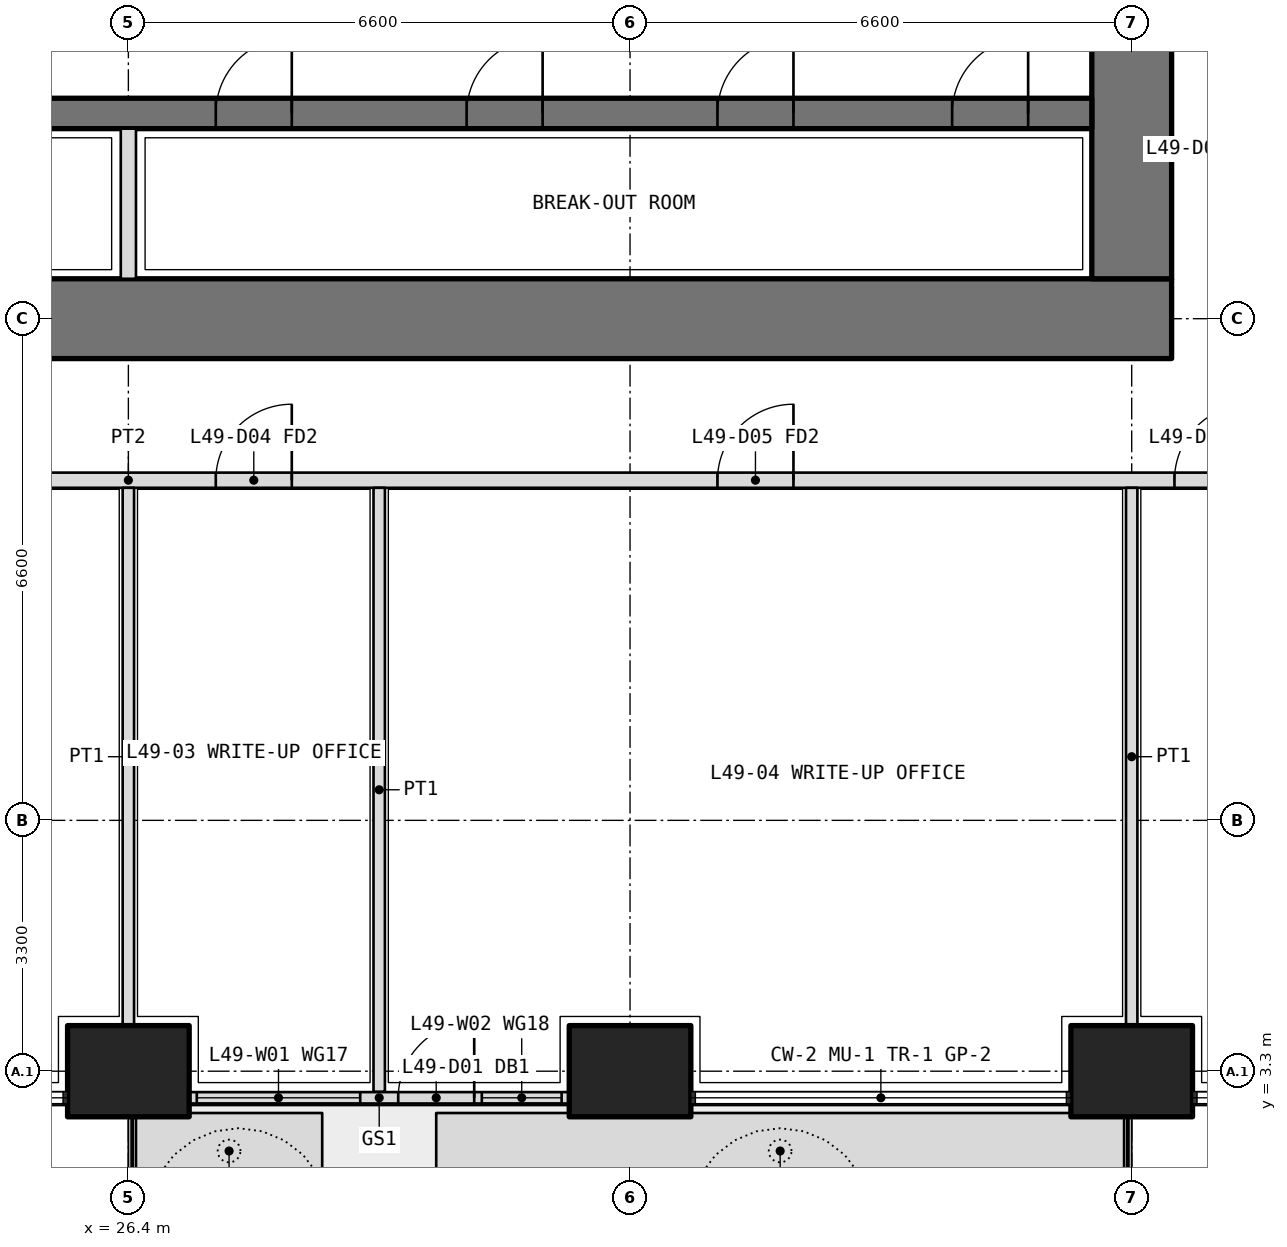
"""IFC4 building model, lengths in metres.
Left out: names, types, materials, properties, quantities, classifications, styles, units other than length and angle.
Written with IfcOpenShell. Run it as: python <this file> out.ifc"""

import sys

from ifc_helpers import new_model, si_unit, direction, frame, frame_2d, origin, origin_2d, place, context, subcontext, project, spatial, polyline, rectangle, outline, extrude, element, fill, save


model = new_model("IFC4")
c1 = context("Model", 3, precision=1e-05, world=origin(), true_north=direction((0.0, 1.0)))
c2 = subcontext(c1, "Body", "Model", "MODEL_VIEW")
j1 = project(units=[si_unit("LENGTHUNIT", "METRE"), si_unit("PLANEANGLEUNIT", "RADIAN")], contexts=[c1])
p1 = place(None, origin())
s1 = spatial("IfcSite", under=j1, at=p1, CompositionType="ELEMENT")
p2 = place(p1, origin())
s2 = spatial("IfcBuilding", under=s1, at=p2, CompositionType="ELEMENT")
p3 = place(p2, frame((0.0, 0.0, 214.5)))
s3 = spatial("IfcBuildingStorey", under=s2, at=p3, CompositionType="ELEMENT", Elevation=214.5)
for number, where, z_axis, x_axis in (
    (1, (26.4, 3.3, 0.0), (0.0, 0.0, 1.0), (1.0, 0.0, 0.0)),
    (2, (33.0, 3.3, 0.0), (0.0, 0.0, 1.0), (1.0, 0.0, 0.0)),
    (3, (39.6, 3.3, 0.0), (0.0, 0.0, 1.0), (1.0, 0.0, 0.0)),
):
    element("IfcColumn", number, at=place(p3, frame(where, z_axis=z_axis, x_axis=x_axis)), inside=s3, PredefinedType="COLUMN", context=c2, shape_type="SweptSolid", body=[
        extrude(rectangle(XDim=1.6, YDim=1.2, at=origin_2d()), origin(), (0.0, 0.0, 1.0), 4.2),
    ])
p4 = place(p3, origin())
e4 = element("IfcWall", 4, at=p4, inside=s3, PredefinedType="USERDEFINED", context=c2, shape_type="SweptSolid", body=[
    extrude(outline(polyline([(26.5, 1.75), (28.95, 1.75), (28.95, 2.75), (26.5, 2.75), (26.5, 1.75)]), holes=[polyline([(26.65, 1.9), (28.8, 1.9), (28.8, 2.6), (26.65, 2.6), (26.65, 1.9)])]), origin(), (0.0, 0.0, 1.0), 1.05),
])
p5 = place(p3, origin())
e5 = element("IfcWall", 5, at=p5, inside=s3, PredefinedType="USERDEFINED", context=c2, shape_type="SweptSolid", body=[
    extrude(outline(polyline([(30.45, 1.75), (39.5, 1.75), (39.5, 2.75), (30.45, 2.75), (30.45, 1.75)]), holes=[polyline([(30.6, 1.9), (39.35, 1.9), (39.35, 2.6), (30.6, 2.6), (30.6, 1.9)])]), origin(), (0.0, 0.0, 1.0), 1.05),
])
p6 = place(p3, frame((27.2, 2.95, 0.0), z_axis=(0.0, 0.0, 1.0), x_axis=(1.0, 0.0, 0.0)))
e6 = element("IfcWall", 6, at=p6, inside=s3, PredefinedType="SOLIDWALL", context=c2, shape_type="SweptSolid", body=[
    extrude(rectangle(XDim=5.0, YDim=0.15, at=frame_2d((2.5, 0.0))), origin(), (0.0, 0.0, 1.0), 2.6),
])
p7 = place(p6, frame((2.75, 0.0, 0.0)))
e7 = element("IfcOpeningElement", 7, at=p7, cuts=e6, PredefinedType="OPENING", context=c2, shape_type="SweptSolid", body=[
    extrude(rectangle(XDim=1.0, YDim=2.4, at=frame_2d((0.5, 1.2))), frame((0.0, 0.085, 0.0), z_axis=(0.0, -1.0, 0.0), x_axis=(1.0, 0.0, 0.0)), (0.0, 0.0, 1.0), 0.17),
])
p8 = place(p6, frame((0.1, 0.0, 0.1)))
e8 = element("IfcOpeningElement", 8, at=p8, cuts=e6, PredefinedType="OPENING", context=c2, shape_type="SweptSolid", body=[
    extrude(rectangle(XDim=2.15, YDim=2.2, at=frame_2d((1.075, 1.1))), frame((0.0, 0.085, 0.0), z_axis=(0.0, -1.0, 0.0), x_axis=(1.0, 0.0, 0.0)), (0.0, 0.0, 1.0), 0.17),
])
p9 = place(p6, frame((3.85, 0.0, 0.1)))
e9 = element("IfcOpeningElement", 9, at=p9, cuts=e6, PredefinedType="OPENING", context=c2, shape_type="SweptSolid", body=[
    extrude(rectangle(XDim=1.05, YDim=2.2, at=frame_2d((0.525, 1.1))), frame((0.0, 0.085, 0.0), z_axis=(0.0, -1.0, 0.0), x_axis=(1.0, 0.0, 0.0)), (0.0, 0.0, 1.0), 0.17),
])
p10 = place(p3, frame((12.675, 13.2, 0.0), z_axis=(0.0, 0.0, 1.0), x_axis=(1.0, 0.0, 0.0)))
e10 = element("IfcWall", 10, at=p10, inside=s3, PredefinedType="SHEAR", context=c2, shape_type="SweptSolid", body=[
    extrude(rectangle(XDim=27.45, YDim=1.05, at=frame_2d((13.725, 0.0))), origin(), (0.0, 0.0, 1.0), 4.2),
])
p11 = place(p3, frame((39.6, 13.725, 0.0), z_axis=(0.0, 0.0, 1.0), x_axis=(0.0, 1.0, 0.0)))
e11 = element("IfcWall", 11, at=p11, inside=s3, PredefinedType="SHEAR", context=c2, shape_type="SweptSolid", body=[
    extrude(rectangle(XDim=18.75, YDim=1.05, at=frame_2d((9.375, 0.0))), origin(), (0.0, 0.0, 1.0), 4.2),
])
p12 = place(p11, frame((3.025, 0.0, 0.0)))
e12 = element("IfcOpeningElement", 12, at=p12, cuts=e11, PredefinedType="OPENING", context=c2, shape_type="SweptSolid", body=[
    extrude(rectangle(XDim=1.6, YDim=2.1, at=frame_2d((0.8, 1.05))), frame((0.0, 0.535, 0.0), z_axis=(0.0, -1.0, 0.0), x_axis=(1.0, 0.0, 0.0)), (0.0, 0.0, 1.0), 1.07),
])
p13 = place(p11, frame((13.825, 0.0, 0.0)))
e13 = element("IfcOpeningElement", 13, at=p13, cuts=e11, PredefinedType="OPENING", context=c2, shape_type="SweptSolid", body=[
    extrude(rectangle(XDim=1.6, YDim=2.1, at=frame_2d((0.8, 1.05))), frame((0.0, 0.535, 0.0), z_axis=(0.0, -1.0, 0.0), x_axis=(1.0, 0.0, 0.0)), (0.0, 0.0, 1.0), 1.07),
])
p14 = place(p3, frame((13.725, 15.9, 0.0), z_axis=(0.0, 0.0, 1.0), x_axis=(1.0, 0.0, 0.0)))
e14 = element("IfcWall", 14, at=p14, inside=s3, PredefinedType="SHEAR", context=c2, shape_type="SweptSolid", body=[
    extrude(rectangle(XDim=25.35, YDim=0.4, at=frame_2d((12.675, 0.0))), origin(), (0.0, 0.0, 1.0), 4.2),
])
p15 = place(p14, frame((0.837, 0.0, 0.0)))
e15 = element("IfcOpeningElement", 15, at=p15, cuts=e14, PredefinedType="OPENING", context=c2, shape_type="SweptSolid", body=[
    extrude(rectangle(XDim=1.0, YDim=2.1, at=frame_2d((0.5, 1.05))), frame((0.0, 0.21, 0.0), z_axis=(0.0, -1.0, 0.0), x_axis=(1.0, 0.0, 0.0)), (0.0, 0.0, 1.0), 0.42),
])
p16 = place(p14, frame((3.925, 0.0, 0.0)))
e16 = element("IfcOpeningElement", 16, at=p16, cuts=e14, PredefinedType="OPENING", context=c2, shape_type="SweptSolid", body=[
    extrude(rectangle(XDim=1.0, YDim=2.1, at=frame_2d((0.5, 1.05))), frame((0.0, 0.21, 0.0), z_axis=(0.0, -1.0, 0.0), x_axis=(1.0, 0.0, 0.0)), (0.0, 0.0, 1.0), 0.42),
])
p17 = place(p14, frame((7.225, 0.0, 0.0)))
e17 = element("IfcOpeningElement", 17, at=p17, cuts=e14, PredefinedType="OPENING", context=c2, shape_type="SweptSolid", body=[
    extrude(rectangle(XDim=1.0, YDim=2.1, at=frame_2d((0.5, 1.05))), frame((0.0, 0.21, 0.0), z_axis=(0.0, -1.0, 0.0), x_axis=(1.0, 0.0, 0.0)), (0.0, 0.0, 1.0), 0.42),
])
p18 = place(p14, frame((10.525, 0.0, 0.0)))
e18 = element("IfcOpeningElement", 18, at=p18, cuts=e14, PredefinedType="OPENING", context=c2, shape_type="SweptSolid", body=[
    extrude(rectangle(XDim=1.0, YDim=2.1, at=frame_2d((0.5, 1.05))), frame((0.0, 0.21, 0.0), z_axis=(0.0, -1.0, 0.0), x_axis=(1.0, 0.0, 0.0)), (0.0, 0.0, 1.0), 0.42),
])
p19 = place(p14, frame((13.825, 0.0, 0.0)))
e19 = element("IfcOpeningElement", 19, at=p19, cuts=e14, PredefinedType="OPENING", context=c2, shape_type="SweptSolid", body=[
    extrude(rectangle(XDim=1.0, YDim=2.1, at=frame_2d((0.5, 1.05))), frame((0.0, 0.21, 0.0), z_axis=(0.0, -1.0, 0.0), x_axis=(1.0, 0.0, 0.0)), (0.0, 0.0, 1.0), 0.42),
])
p20 = place(p14, frame((17.125, 0.0, 0.0)))
e20 = element("IfcOpeningElement", 20, at=p20, cuts=e14, PredefinedType="OPENING", context=c2, shape_type="SweptSolid", body=[
    extrude(rectangle(XDim=1.0, YDim=2.1, at=frame_2d((0.5, 1.05))), frame((0.0, 0.21, 0.0), z_axis=(0.0, -1.0, 0.0), x_axis=(1.0, 0.0, 0.0)), (0.0, 0.0, 1.0), 0.42),
])
p21 = place(p14, frame((20.425, 0.0, 0.0)))
e21 = element("IfcOpeningElement", 21, at=p21, cuts=e14, PredefinedType="OPENING", context=c2, shape_type="SweptSolid", body=[
    extrude(rectangle(XDim=1.0, YDim=2.1, at=frame_2d((0.5, 1.05))), frame((0.0, 0.21, 0.0), z_axis=(0.0, -1.0, 0.0), x_axis=(1.0, 0.0, 0.0)), (0.0, 0.0, 1.0), 0.42),
])
p22 = place(p14, frame((23.512, 0.0, 0.0)))
e22 = element("IfcOpeningElement", 22, at=p22, cuts=e14, PredefinedType="OPENING", context=c2, shape_type="SweptSolid", body=[
    extrude(rectangle(XDim=1.0, YDim=2.1, at=frame_2d((0.5, 1.05))), frame((0.0, 0.21, 0.0), z_axis=(0.0, -1.0, 0.0), x_axis=(1.0, 0.0, 0.0)), (0.0, 0.0, 1.0), 0.42),
])
p23 = place(p3, frame((26.4, 13.725, 0.0), z_axis=(0.0, 0.0, 1.0), x_axis=(0.0, 1.0, 0.0)))
e23 = element("IfcWall", 23, at=p23, inside=s3, PredefinedType="PARTITIONING", context=c2, shape_type="SweptSolid", body=[
    extrude(rectangle(XDim=1.975, YDim=0.2, at=frame_2d((0.987, 0.0))), origin(), (0.0, 0.0, 1.0), 4.2),
])
p24 = place(p3, frame((10.975, 11.075, 0.0), z_axis=(0.0, 0.0, 1.0), x_axis=(1.0, 0.0, 0.0)))
e24 = element("IfcWall", 24, at=p24, inside=s3, PredefinedType="PARTITIONING", context=c2, shape_type="SweptSolid", body=[
    extrude(rectangle(XDim=30.85, YDim=0.2, at=frame_2d((15.425, 0.0))), origin(), (0.0, 0.0, 1.0), 2.85),
])
p25 = place(p24, frame((2.312, 0.0, 0.0)))
e25 = element("IfcOpeningElement", 25, at=p25, cuts=e24, PredefinedType="OPENING", context=c2, shape_type="SweptSolid", body=[
    extrude(rectangle(XDim=1.0, YDim=2.1, at=frame_2d((0.5, 1.05))), frame((0.0, 0.11, 0.0), z_axis=(0.0, -1.0, 0.0), x_axis=(1.0, 0.0, 0.0)), (0.0, 0.0, 1.0), 0.22),
])
p26 = place(p24, frame((9.975, 0.0, 0.0)))
e26 = element("IfcOpeningElement", 26, at=p26, cuts=e24, PredefinedType="OPENING", context=c2, shape_type="SweptSolid", body=[
    extrude(rectangle(XDim=1.0, YDim=2.1, at=frame_2d((0.5, 1.05))), frame((0.0, 0.11, 0.0), z_axis=(0.0, -1.0, 0.0), x_axis=(1.0, 0.0, 0.0)), (0.0, 0.0, 1.0), 0.22),
])
p27 = place(p24, frame((16.575, 0.0, 0.0)))
e27 = element("IfcOpeningElement", 27, at=p27, cuts=e24, PredefinedType="OPENING", context=c2, shape_type="SweptSolid", body=[
    extrude(rectangle(XDim=1.0, YDim=2.1, at=frame_2d((0.5, 1.05))), frame((0.0, 0.11, 0.0), z_axis=(0.0, -1.0, 0.0), x_axis=(1.0, 0.0, 0.0)), (0.0, 0.0, 1.0), 0.22),
])
p28 = place(p24, frame((23.175, 0.0, 0.0)))
e28 = element("IfcOpeningElement", 28, at=p28, cuts=e24, PredefinedType="OPENING", context=c2, shape_type="SweptSolid", body=[
    extrude(rectangle(XDim=1.0, YDim=2.1, at=frame_2d((0.5, 1.05))), frame((0.0, 0.11, 0.0), z_axis=(0.0, -1.0, 0.0), x_axis=(1.0, 0.0, 0.0)), (0.0, 0.0, 1.0), 0.22),
])
p29 = place(p24, frame((29.188, 0.0, 0.0)))
e29 = element("IfcOpeningElement", 29, at=p29, cuts=e24, PredefinedType="OPENING", context=c2, shape_type="SweptSolid", body=[
    extrude(rectangle(XDim=1.0, YDim=2.1, at=frame_2d((0.5, 1.05))), frame((0.0, 0.11, 0.0), z_axis=(0.0, -1.0, 0.0), x_axis=(1.0, 0.0, 0.0)), (0.0, 0.0, 1.0), 0.22),
])
p30 = place(p3, frame((26.4, 3.9, 0.0), z_axis=(0.0, 0.0, 1.0), x_axis=(0.0, 1.0, 0.0)))
e30 = element("IfcWall", 30, at=p30, inside=s3, PredefinedType="PARTITIONING", context=c2, shape_type="SweptSolid", body=[
    extrude(rectangle(XDim=7.075, YDim=0.15, at=frame_2d((3.538, 0.0))), origin(), (0.0, 0.0, 1.0), 2.85),
])
p31 = place(p3, frame((29.7, 3.03, 0.0), z_axis=(0.0, 0.0, 1.0), x_axis=(0.0, 1.0, 0.0)))
e31 = element("IfcWall", 31, at=p31, inside=s3, PredefinedType="PARTITIONING", context=c2, shape_type="SweptSolid", body=[
    extrude(rectangle(XDim=7.945, YDim=0.15, at=frame_2d((3.973, 0.0))), origin(), (0.0, 0.0, 1.0), 2.6),
])
p32 = place(p3, frame((39.6, 3.9, 0.0), z_axis=(0.0, 0.0, 1.0), x_axis=(0.0, 1.0, 0.0)))
e32 = element("IfcWall", 32, at=p32, inside=s3, PredefinedType="PARTITIONING", context=c2, shape_type="SweptSolid", body=[
    extrude(rectangle(XDim=7.075, YDim=0.15, at=frame_2d((3.538, 0.0))), origin(), (0.0, 0.0, 1.0), 2.85),
])
p33 = place(p7, origin())
e33 = element("IfcDoor", 33, at=p33, inside=s3, OperationType="SINGLE_SWING_RIGHT", PredefinedType="DOOR", context=c2, shape_type="SweptSolid", body=[
    extrude(rectangle(XDim=1.0, YDim=2.4, at=frame_2d((0.5, 1.2))), frame((0.0, 0.025, 0.0), z_axis=(0.0, -1.0, 0.0), x_axis=(1.0, 0.0, 0.0)), (0.0, 0.0, 1.0), 0.05),
])
fill(e7, e33)
p34 = place(p8, origin())
e34 = element("IfcWindow", 34, at=p34, inside=s3, PartitioningType="SINGLE_PANEL", PredefinedType="WINDOW", context=c2, shape_type="SweptSolid", body=[
    extrude(rectangle(XDim=2.15, YDim=2.2, at=frame_2d((1.075, 1.1))), frame((0.0, 0.03, 0.0), z_axis=(0.0, -1.0, 0.0), x_axis=(1.0, 0.0, 0.0)), (0.0, 0.0, 1.0), 0.06),
])
fill(e8, e34)
p35 = place(p9, origin())
e35 = element("IfcWindow", 35, at=p35, inside=s3, PartitioningType="SINGLE_PANEL", PredefinedType="WINDOW", context=c2, shape_type="SweptSolid", body=[
    extrude(rectangle(XDim=1.05, YDim=2.2, at=frame_2d((0.525, 1.1))), frame((0.0, 0.03, 0.0), z_axis=(0.0, -1.0, 0.0), x_axis=(1.0, 0.0, 0.0)), (0.0, 0.0, 1.0), 0.06),
])
fill(e9, e35)
p36 = place(p27, origin())
e36 = element("IfcDoor", 36, at=p36, inside=s3, OperationType="SINGLE_SWING_RIGHT", PredefinedType="DOOR", context=c2, shape_type="SweptSolid", body=[
    extrude(rectangle(XDim=1.0, YDim=2.1, at=frame_2d((0.5, 1.05))), frame((0.0, 0.025, 0.0), z_axis=(0.0, -1.0, 0.0), x_axis=(1.0, 0.0, 0.0)), (0.0, 0.0, 1.0), 0.05),
])
fill(e27, e36)
p37 = place(p28, origin())
e37 = element("IfcDoor", 37, at=p37, inside=s3, OperationType="SINGLE_SWING_RIGHT", PredefinedType="DOOR", context=c2, shape_type="SweptSolid", body=[
    extrude(rectangle(XDim=1.0, YDim=2.1, at=frame_2d((0.5, 1.05))), frame((0.0, 0.025, 0.0), z_axis=(0.0, -1.0, 0.0), x_axis=(1.0, 0.0, 0.0)), (0.0, 0.0, 1.0), 0.05),
])
fill(e28, e37)
p38 = place(p29, origin())
e38 = element("IfcDoor", 38, at=p38, inside=s3, OperationType="SINGLE_SWING_RIGHT", PredefinedType="DOOR", context=c2, shape_type="SweptSolid", body=[
    extrude(rectangle(XDim=1.0, YDim=2.1, at=frame_2d((0.5, 1.05))), frame((0.0, 0.025, 0.0), z_axis=(0.0, -1.0, 0.0), x_axis=(1.0, 0.0, 0.0)), (0.0, 0.0, 1.0), 0.05),
])
fill(e29, e38)
p39 = place(p19, origin())
e39 = element("IfcDoor", 39, at=p39, inside=s3, OperationType="SINGLE_SWING_RIGHT", PredefinedType="DOOR", context=c2, shape_type="SweptSolid", body=[
    extrude(rectangle(XDim=1.0, YDim=2.1, at=frame_2d((0.5, 1.05))), frame((0.0, 0.025, 0.0), z_axis=(0.0, -1.0, 0.0), x_axis=(1.0, 0.0, 0.0)), (0.0, 0.0, 1.0), 0.05),
])
fill(e19, e39)
p40 = place(p20, origin())
e40 = element("IfcDoor", 40, at=p40, inside=s3, OperationType="SINGLE_SWING_RIGHT", PredefinedType="DOOR", context=c2, shape_type="SweptSolid", body=[
    extrude(rectangle(XDim=1.0, YDim=2.1, at=frame_2d((0.5, 1.05))), frame((0.0, 0.025, 0.0), z_axis=(0.0, -1.0, 0.0), x_axis=(1.0, 0.0, 0.0)), (0.0, 0.0, 1.0), 0.05),
])
fill(e20, e40)
p41 = place(p21, origin())
e41 = element("IfcDoor", 41, at=p41, inside=s3, OperationType="SINGLE_SWING_RIGHT", PredefinedType="DOOR", context=c2, shape_type="SweptSolid", body=[
    extrude(rectangle(XDim=1.0, YDim=2.1, at=frame_2d((0.5, 1.05))), frame((0.0, 0.025, 0.0), z_axis=(0.0, -1.0, 0.0), x_axis=(1.0, 0.0, 0.0)), (0.0, 0.0, 1.0), 0.05),
])
fill(e21, e41)
p42 = place(p22, origin())
e42 = element("IfcDoor", 42, at=p42, inside=s3, OperationType="SINGLE_SWING_RIGHT", PredefinedType="DOOR", context=c2, shape_type="SweptSolid", body=[
    extrude(rectangle(XDim=1.0, YDim=2.1, at=frame_2d((0.5, 1.05))), frame((0.0, 0.025, 0.0), z_axis=(0.0, -1.0, 0.0), x_axis=(1.0, 0.0, 0.0)), (0.0, 0.0, 1.0), 0.05),
])
fill(e22, e42)
save(model, sys.argv[1])
